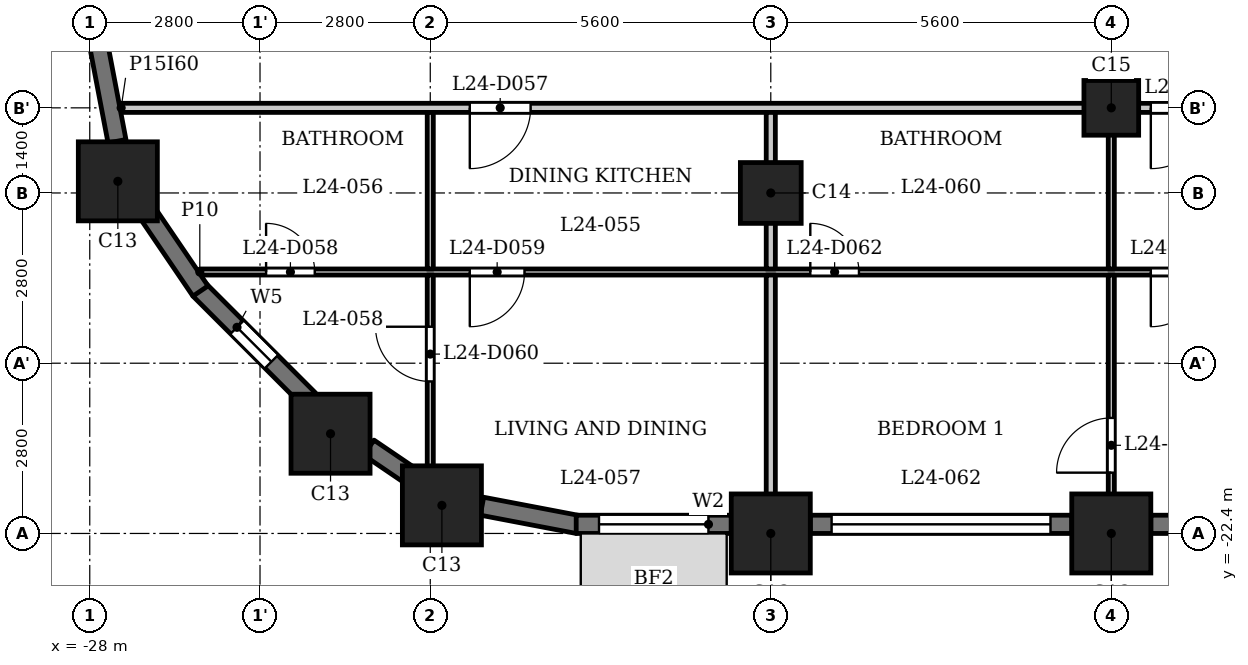
"""IFC4 building model, lengths in metres.
Left out: names, types, materials, properties, quantities, classifications, styles, units other than length and angle.
Written with IfcOpenShell. Run it as: python <this file> out.ifc"""

import sys

from ifc_helpers import new_model, si_unit, direction, frame, frame_2d, origin, origin_2d, place, context, subcontext, project, spatial, rectangle, extrude, element, fill, save


model = new_model("IFC4")
c1 = context("Model", 3, precision=1e-05, world=origin(), true_north=direction((0.0, 1.0)))
c2 = subcontext(c1, "Body", "Model", "MODEL_VIEW")
j1 = project(units=[si_unit("LENGTHUNIT", "METRE"), si_unit("PLANEANGLEUNIT", "RADIAN")], contexts=[c1])
p1 = place(None, origin())
s1 = spatial("IfcSite", under=j1, at=p1, CompositionType="ELEMENT")
p2 = place(p1, origin())
s2 = spatial("IfcBuilding", under=s1, at=p2, CompositionType="ELEMENT")
p3 = place(p2, frame((0.0, 0.0, 97.3)))
s3 = spatial("IfcBuildingStorey", under=s2, at=p3, CompositionType="ELEMENT", Elevation=97.3)
for number, where, z_axis, x_axis in (
    (1, (-22.209, -21.938, 0.0), (0.0, 0.0, 1.0), (1.0, 0.0, 0.0)),
    (2, (-16.8, -22.4, 0.0), (0.0, 0.0, 1.0), (1.0, 0.0, 0.0)),
    (3, (-11.2, -22.4, 0.0), (0.0, 0.0, 1.0), (1.0, 0.0, 0.0)),
    (4, (-27.538, -16.609, 0.0), (0.0, 0.0, 1.0), (1.0, 0.0, 0.0)),
    (5, (-24.04, -20.76, 0.0), (0.0, 0.0, 1.0), (1.0, 0.0, 0.0)),
):
    element("IfcColumn", number, at=place(p3, frame(where, z_axis=z_axis, x_axis=x_axis)), inside=s3, PredefinedType="COLUMN", context=c2, shape_type="SweptSolid", body=[
        extrude(rectangle(XDim=1.3, YDim=1.3, at=origin_2d()), origin(), (0.0, 0.0, 1.0), 3.5),
    ])
p4 = place(p3, frame((-16.8, -16.8, 0.0), z_axis=(0.0, 0.0, 1.0), x_axis=(1.0, 0.0, 0.0)))
e6 = element("IfcColumn", 6, at=p4, inside=s3, PredefinedType="COLUMN", context=c2, shape_type="SweptSolid", body=[
    extrude(rectangle(XDim=1.0, YDim=1.0, at=origin_2d()), origin(), (0.0, 0.0, 1.0), 3.5),
])
p5 = place(p3, frame((-11.2, -15.4, 0.0), z_axis=(0.0, 0.0, 1.0), x_axis=(1.0, 0.0, 0.0)))
e7 = element("IfcColumn", 7, at=p5, inside=s3, PredefinedType="COLUMN", context=c2, shape_type="SweptSolid", body=[
    extrude(rectangle(XDim=0.9, YDim=0.9, at=origin_2d()), origin(), (0.0, 0.0, 1.0), 3.5),
])
p6 = place(p3, frame((-26.197, -18.391, 0.0), z_axis=(0.0, 0.0, 1.0), x_axis=(0.707058908279, -0.707154650853, 0.0)))
e8 = element("IfcWall", 8, at=p6, inside=s3, PredefinedType="SOLIDWALL", context=c2, shape_type="SweptSolid", body=[
    extrude(rectangle(XDim=2.55, YDim=0.3, at=frame_2d((1.275, 0.0))), origin(), (0.0, 0.0, 1.0), 2.4),
])
p7 = place(p6, frame((0.875, 0.0, 0.6)))
e9 = element("IfcOpeningElement", 9, at=p7, cuts=e8, PredefinedType="OPENING", context=c2, shape_type="SweptSolid", body=[
    extrude(rectangle(XDim=0.8, YDim=1.55, at=frame_2d((0.4, 0.775))), frame((0.0, 0.16, 0.0), z_axis=(0.0, -1.0, 0.0), x_axis=(1.0, 0.0, 0.0)), (0.0, 0.0, 1.0), 0.32),
])
p8 = place(p3, frame((-23.41, -20.989, 0.0), z_axis=(0.0, 0.0, 1.0), x_axis=(0.827050703543, -0.562127328787, 0.0)))
e10 = element("IfcWall", 10, at=p8, inside=s3, PredefinedType="SOLIDWALL", context=c2, shape_type="SweptSolid", body=[
    extrude(rectangle(XDim=0.877, YDim=0.3, at=frame_2d((0.438, 0.0))), origin(), (0.0, 0.0, 1.0), 3.2),
])
p9 = place(p3, frame((-21.55, -21.952, 0.0), z_axis=(0.0, 0.0, 1.0), x_axis=(0.982278644094, -0.187426426519, 0.0)))
e11 = element("IfcWall", 11, at=p9, inside=s3, PredefinedType="SOLIDWALL", context=c2, shape_type="SweptSolid", body=[
    extrude(rectangle(XDim=1.606, YDim=0.3, at=frame_2d((0.803, 0.0))), origin(), (0.0, 0.0, 1.0), 2.4),
])
p10 = place(p3, frame((-20.0, -22.25, 0.0), z_axis=(0.0, 0.0, 1.0), x_axis=(1.0, 0.0, 0.0)))
e12 = element("IfcWall", 12, at=p10, inside=s3, PredefinedType="SOLIDWALL", context=c2, shape_type="SweptSolid", body=[
    extrude(rectangle(XDim=2.55, YDim=0.3, at=frame_2d((1.275, 0.0))), origin(), (0.0, 0.0, 1.0), 2.4),
])
p11 = place(p10, frame((0.375, 0.0, 0.9)))
e13 = element("IfcOpeningElement", 13, at=p11, cuts=e12, PredefinedType="OPENING", context=c2, shape_type="SweptSolid", body=[
    extrude(rectangle(XDim=1.8, YDim=1.25, at=frame_2d((0.9, 0.625))), frame((0.0, 0.16, 0.0), z_axis=(0.0, -1.0, 0.0), x_axis=(1.0, 0.0, 0.0)), (0.0, 0.0, 1.0), 0.32),
])
p12 = place(p3, frame((-16.15, -22.25, 0.0), z_axis=(0.0, 0.0, 1.0), x_axis=(1.0, 0.0, 0.0)))
e14 = element("IfcWall", 14, at=p12, inside=s3, PredefinedType="SOLIDWALL", context=c2, shape_type="SweptSolid", body=[
    extrude(rectangle(XDim=4.3, YDim=0.3, at=frame_2d((2.15, 0.0))), origin(), (0.0, 0.0, 1.0), 2.4),
])
p13 = place(p12, frame((0.35, 0.0, 1.2)))
e15 = element("IfcOpeningElement", 15, at=p13, cuts=e14, PredefinedType="OPENING", context=c2, shape_type="SweptSolid", body=[
    extrude(rectangle(XDim=3.6, YDim=0.95, at=frame_2d((1.8, 0.475))), frame((0.0, 0.16, 0.0), z_axis=(0.0, -1.0, 0.0), x_axis=(1.0, 0.0, 0.0)), (0.0, 0.0, 1.0), 0.32),
])
p14 = place(p3, frame((-10.55, -22.25, 0.0), z_axis=(0.0, 0.0, 1.0), x_axis=(1.0, 0.0, 0.0)))
e16 = element("IfcWall", 16, at=p14, inside=s3, PredefinedType="SOLIDWALL", context=c2, shape_type="SweptSolid", body=[
    extrude(rectangle(XDim=4.3, YDim=0.3, at=frame_2d((2.15, 0.0))), origin(), (0.0, 0.0, 1.0), 2.4),
])
p15 = place(p14, frame((0.35, 0.0, 1.2)))
e17 = element("IfcOpeningElement", 17, at=p15, cuts=e16, PredefinedType="OPENING", context=c2, shape_type="SweptSolid", body=[
    extrude(rectangle(XDim=3.6, YDim=0.95, at=frame_2d((1.8, 0.475))), frame((0.0, 0.16, 0.0), z_axis=(0.0, -1.0, 0.0), x_axis=(1.0, 0.0, 0.0)), (0.0, 0.0, 1.0), 0.32),
])
for number, where, z_axis, x_axis in (
    (18, (-27.853, -14.372, 0.0), (0.0, 0.0, 1.0), (0.187, -0.982, 0.0)),
    (19, (-27.082, -17.084, 0.0), (0.0, 0.0, 1.0), (0.562, -0.827, 0.0)),
):
    element("IfcWall", number, at=place(p3, frame(where, z_axis=z_axis, x_axis=x_axis)), inside=s3, PredefinedType="SOLIDWALL", context=c2, shape_type="SweptSolid", body=[
        extrude(rectangle(XDim=1.606, YDim=0.3, at=frame_2d((0.803, 0.0))), origin(), (0.0, 0.0, 1.0), 2.4),
    ])
p16 = place(p3, frame((-26.19, -18.1, 0.0), z_axis=(0.0, 0.0, 1.0), x_axis=(1.0, 0.0, 0.0)))
e20 = element("IfcWall", 20, at=p16, inside=s3, PredefinedType="PARTITIONING", context=c2, shape_type="SweptSolid", body=[
    extrude(rectangle(XDim=52.63, YDim=0.1, at=frame_2d((26.315, 0.0))), origin(), (0.0, 0.0, 1.0), 3.2),
])
p17 = place(p16, frame((1.09, 0.0, 0.0)))
e21 = element("IfcOpeningElement", 21, at=p17, cuts=e20, PredefinedType="OPENING", context=c2, shape_type="SweptSolid", body=[
    extrude(rectangle(XDim=0.8, YDim=2.1, at=frame_2d((0.4, 1.05))), frame((0.0, 0.06, 0.0), z_axis=(0.0, -1.0, 0.0), x_axis=(1.0, 0.0, 0.0)), (0.0, 0.0, 1.0), 0.12),
])
p18 = place(p16, frame((4.44, 0.0, 0.0)))
e22 = element("IfcOpeningElement", 22, at=p18, cuts=e20, PredefinedType="OPENING", context=c2, shape_type="SweptSolid", body=[
    extrude(rectangle(XDim=0.9, YDim=2.1, at=frame_2d((0.45, 1.05))), frame((0.0, 0.06, 0.0), z_axis=(0.0, -1.0, 0.0), x_axis=(1.0, 0.0, 0.0)), (0.0, 0.0, 1.0), 0.12),
])
p19 = place(p16, frame((10.04, 0.0, 0.0)))
e23 = element("IfcOpeningElement", 23, at=p19, cuts=e20, PredefinedType="OPENING", context=c2, shape_type="SweptSolid", body=[
    extrude(rectangle(XDim=0.8, YDim=2.1, at=frame_2d((0.4, 1.05))), frame((0.0, 0.06, 0.0), z_axis=(0.0, -1.0, 0.0), x_axis=(1.0, 0.0, 0.0)), (0.0, 0.0, 1.0), 0.12),
])
p20 = place(p16, frame((15.64, 0.0, 0.0)))
e24 = element("IfcOpeningElement", 24, at=p20, cuts=e20, PredefinedType="OPENING", context=c2, shape_type="SweptSolid", body=[
    extrude(rectangle(XDim=0.9, YDim=2.1, at=frame_2d((0.45, 1.05))), frame((0.0, 0.06, 0.0), z_axis=(0.0, -1.0, 0.0), x_axis=(1.0, 0.0, 0.0)), (0.0, 0.0, 1.0), 0.12),
])
p21 = place(p16, frame((24.74, 0.0, 0.0)))
e25 = element("IfcOpeningElement", 25, at=p21, cuts=e20, PredefinedType="OPENING", context=c2, shape_type="SweptSolid", body=[
    extrude(rectangle(XDim=0.8, YDim=2.1, at=frame_2d((0.4, 1.05))), frame((0.0, 0.06, 0.0), z_axis=(0.0, -1.0, 0.0), x_axis=(1.0, 0.0, 0.0)), (0.0, 0.0, 1.0), 0.12),
])
p22 = place(p16, frame((21.24, 0.0, 0.0)))
e26 = element("IfcOpeningElement", 26, at=p22, cuts=e20, PredefinedType="OPENING", context=c2, shape_type="SweptSolid", body=[
    extrude(rectangle(XDim=0.9, YDim=2.1, at=frame_2d((0.45, 1.05))), frame((0.0, 0.06, 0.0), z_axis=(0.0, -1.0, 0.0), x_axis=(1.0, 0.0, 0.0)), (0.0, 0.0, 1.0), 0.12),
])
p23 = place(p16, frame((35.94, 0.0, 0.0)))
e27 = element("IfcOpeningElement", 27, at=p23, cuts=e20, PredefinedType="OPENING", context=c2, shape_type="SweptSolid", body=[
    extrude(rectangle(XDim=0.8, YDim=2.1, at=frame_2d((0.4, 1.05))), frame((0.0, 0.06, 0.0), z_axis=(0.0, -1.0, 0.0), x_axis=(1.0, 0.0, 0.0)), (0.0, 0.0, 1.0), 0.12),
])
p24 = place(p16, frame((33.19, 0.0, 0.0)))
e28 = element("IfcOpeningElement", 28, at=p24, cuts=e20, PredefinedType="OPENING", context=c2, shape_type="SweptSolid", body=[
    extrude(rectangle(XDim=0.9, YDim=2.1, at=frame_2d((0.45, 1.05))), frame((0.0, 0.06, 0.0), z_axis=(0.0, -1.0, 0.0), x_axis=(1.0, 0.0, 0.0)), (0.0, 0.0, 1.0), 0.12),
])
p25 = place(p16, frame((27.59, 0.0, 0.0)))
e29 = element("IfcOpeningElement", 29, at=p25, cuts=e20, PredefinedType="OPENING", context=c2, shape_type="SweptSolid", body=[
    extrude(rectangle(XDim=0.9, YDim=2.1, at=frame_2d((0.45, 1.05))), frame((0.0, 0.06, 0.0), z_axis=(0.0, -1.0, 0.0), x_axis=(1.0, 0.0, 0.0)), (0.0, 0.0, 1.0), 0.12),
])
p26 = place(p16, frame((29.64, 0.0, 0.0)))
e30 = element("IfcOpeningElement", 30, at=p26, cuts=e20, PredefinedType="OPENING", context=c2, shape_type="SweptSolid", body=[
    extrude(rectangle(XDim=0.9, YDim=2.1, at=frame_2d((0.45, 1.05))), frame((0.0, 0.06, 0.0), z_axis=(0.0, -1.0, 0.0), x_axis=(1.0, 0.0, 0.0)), (0.0, 0.0, 1.0), 0.12),
])
p27 = place(p16, frame((41.54, 0.0, 0.0)))
e31 = element("IfcOpeningElement", 31, at=p27, cuts=e20, PredefinedType="OPENING", context=c2, shape_type="SweptSolid", body=[
    extrude(rectangle(XDim=0.8, YDim=2.1, at=frame_2d((0.4, 1.05))), frame((0.0, 0.06, 0.0), z_axis=(0.0, -1.0, 0.0), x_axis=(1.0, 0.0, 0.0)), (0.0, 0.0, 1.0), 0.12),
])
p28 = place(p16, frame((38.54, 0.0, 0.0)))
e32 = element("IfcOpeningElement", 32, at=p28, cuts=e20, PredefinedType="OPENING", context=c2, shape_type="SweptSolid", body=[
    extrude(rectangle(XDim=0.9, YDim=2.1, at=frame_2d((0.45, 1.05))), frame((0.0, 0.06, 0.0), z_axis=(0.0, -1.0, 0.0), x_axis=(1.0, 0.0, 0.0)), (0.0, 0.0, 1.0), 0.12),
])
p29 = place(p16, frame((49.204, 0.0, 0.0)))
e33 = element("IfcOpeningElement", 33, at=p29, cuts=e20, PredefinedType="OPENING", context=c2, shape_type="SweptSolid", body=[
    extrude(rectangle(XDim=0.8, YDim=2.1, at=frame_2d((0.4, 1.05))), frame((0.0, 0.06, 0.0), z_axis=(0.0, -1.0, 0.0), x_axis=(1.0, 0.0, 0.0)), (0.0, 0.0, 1.0), 0.12),
])
p30 = place(p16, frame((43.64, 0.0, 0.0)))
e34 = element("IfcOpeningElement", 34, at=p30, cuts=e20, PredefinedType="OPENING", context=c2, shape_type="SweptSolid", body=[
    extrude(rectangle(XDim=0.9, YDim=2.1, at=frame_2d((0.45, 1.05))), frame((0.0, 0.06, 0.0), z_axis=(0.0, -1.0, 0.0), x_axis=(1.0, 0.0, 0.0)), (0.0, 0.0, 1.0), 0.12),
])
p31 = place(p3, frame((-27.484, -15.4, 0.0), z_axis=(0.0, 0.0, 1.0), x_axis=(1.0, 0.0, 0.0)))
e35 = element("IfcWall", 35, at=p31, inside=s3, PredefinedType="PARTITIONING", context=c2, shape_type="SweptSolid", body=[
    extrude(rectangle(XDim=54.968, YDim=0.15, at=frame_2d((27.484, 0.0))), origin(), (0.0, 0.0, 1.0), 3.2),
])
p32 = place(p31, frame((5.734, 0.0, 0.0)))
e36 = element("IfcOpeningElement", 36, at=p32, cuts=e35, PredefinedType="OPENING", context=c2, shape_type="SweptSolid", body=[
    extrude(rectangle(XDim=1.0, YDim=2.1, at=frame_2d((0.5, 1.05))), frame((0.0, 0.085, 0.0), z_axis=(0.0, -1.0, 0.0), x_axis=(1.0, 0.0, 0.0)), (0.0, 0.0, 1.0), 0.17),
])
p33 = place(p31, frame((16.934, 0.0, 0.0)))
e37 = element("IfcOpeningElement", 37, at=p33, cuts=e35, PredefinedType="OPENING", context=c2, shape_type="SweptSolid", body=[
    extrude(rectangle(XDim=1.0, YDim=2.1, at=frame_2d((0.5, 1.05))), frame((0.0, 0.085, 0.0), z_axis=(0.0, -1.0, 0.0), x_axis=(1.0, 0.0, 0.0)), (0.0, 0.0, 1.0), 0.17),
])
p34 = place(p31, frame((22.534, 0.0, 0.0)))
e38 = element("IfcOpeningElement", 38, at=p34, cuts=e35, PredefinedType="OPENING", context=c2, shape_type="SweptSolid", body=[
    extrude(rectangle(XDim=1.0, YDim=2.1, at=frame_2d((0.5, 1.05))), frame((0.0, 0.085, 0.0), z_axis=(0.0, -1.0, 0.0), x_axis=(1.0, 0.0, 0.0)), (0.0, 0.0, 1.0), 0.17),
])
p35 = place(p31, frame((31.384, 0.0, 0.0)))
e39 = element("IfcOpeningElement", 39, at=p35, cuts=e35, PredefinedType="OPENING", context=c2, shape_type="SweptSolid", body=[
    extrude(rectangle(XDim=1.0, YDim=2.1, at=frame_2d((0.5, 1.05))), frame((0.0, 0.085, 0.0), z_axis=(0.0, -1.0, 0.0), x_axis=(1.0, 0.0, 0.0)), (0.0, 0.0, 1.0), 0.17),
])
p36 = place(p31, frame((39.584, 0.0, 0.0)))
e40 = element("IfcOpeningElement", 40, at=p36, cuts=e35, PredefinedType="OPENING", context=c2, shape_type="SweptSolid", body=[
    extrude(rectangle(XDim=1.0, YDim=2.1, at=frame_2d((0.5, 1.05))), frame((0.0, 0.085, 0.0), z_axis=(0.0, -1.0, 0.0), x_axis=(1.0, 0.0, 0.0)), (0.0, 0.0, 1.0), 0.17),
])
p37 = place(p31, frame((44.934, 0.0, 0.0)))
e41 = element("IfcOpeningElement", 41, at=p37, cuts=e35, PredefinedType="OPENING", context=c2, shape_type="SweptSolid", body=[
    extrude(rectangle(XDim=1.0, YDim=2.1, at=frame_2d((0.5, 1.05))), frame((0.0, 0.085, 0.0), z_axis=(0.0, -1.0, 0.0), x_axis=(1.0, 0.0, 0.0)), (0.0, 0.0, 1.0), 0.17),
])
p38 = place(p3, frame((-22.4, -21.72, 0.0), z_axis=(0.0, 0.0, 1.0), x_axis=(0.0, 1.0, 0.0)))
e42 = element("IfcWall", 42, at=p38, inside=s3, PredefinedType="PARTITIONING", context=c2, shape_type="SweptSolid", body=[
    extrude(rectangle(XDim=3.57, YDim=0.1, at=frame_2d((1.785, 0.0))), origin(), (0.0, 0.0, 1.0), 3.2),
])
p39 = place(p38, frame((1.82, 0.0, 0.0)))
e43 = element("IfcOpeningElement", 43, at=p39, cuts=e42, PredefinedType="OPENING", context=c2, shape_type="SweptSolid", body=[
    extrude(rectangle(XDim=0.9, YDim=2.1, at=frame_2d((0.45, 1.05))), frame((0.0, 0.06, 0.0), z_axis=(0.0, -1.0, 0.0), x_axis=(1.0, 0.0, 0.0)), (0.0, 0.0, 1.0), 0.12),
])
p40 = place(p3, frame((-22.4, -18.05, 0.0), z_axis=(0.0, 0.0, 1.0), x_axis=(0.0, 1.0, 0.0)))
e44 = element("IfcWall", 44, at=p40, inside=s3, PredefinedType="PARTITIONING", context=c2, shape_type="SweptSolid", body=[
    extrude(rectangle(XDim=2.575, YDim=0.1, at=frame_2d((1.288, 0.0))), origin(), (0.0, 0.0, 1.0), 3.2),
])
p41 = place(p3, frame((-16.8, -23.03, 0.0), z_axis=(0.0, 0.0, 1.0), x_axis=(0.0, 1.0, 0.0)))
e45 = element("IfcWall", 45, at=p41, inside=s3, PredefinedType="PARTITIONING", context=c2, shape_type="SweptSolid", body=[
    extrude(rectangle(XDim=4.88, YDim=0.15, at=frame_2d((2.44, 0.0))), origin(), (0.0, 0.0, 1.0), 3.2),
])
p42 = place(p3, frame((-16.8, -18.05, 0.0), z_axis=(0.0, 0.0, 1.0), x_axis=(0.0, 1.0, 0.0)))
e46 = element("IfcWall", 46, at=p42, inside=s3, PredefinedType="PARTITIONING", context=c2, shape_type="SweptSolid", body=[
    extrude(rectangle(XDim=2.575, YDim=0.15, at=frame_2d((1.288, 0.0))), origin(), (0.0, 0.0, 1.0), 3.2),
])
p43 = place(p3, frame((-11.2, -23.03, 0.0), z_axis=(0.0, 0.0, 1.0), x_axis=(0.0, 1.0, 0.0)))
e47 = element("IfcWall", 47, at=p43, inside=s3, PredefinedType="PARTITIONING", context=c2, shape_type="SweptSolid", body=[
    extrude(rectangle(XDim=4.88, YDim=0.1, at=frame_2d((2.44, 0.0))), origin(), (0.0, 0.0, 1.0), 3.2),
])
p44 = place(p43, frame((1.63, 0.0, 0.0)))
e48 = element("IfcOpeningElement", 48, at=p44, cuts=e47, PredefinedType="OPENING", context=c2, shape_type="SweptSolid", body=[
    extrude(rectangle(XDim=0.9, YDim=2.1, at=frame_2d((0.45, 1.05))), frame((0.0, 0.06, 0.0), z_axis=(0.0, -1.0, 0.0), x_axis=(1.0, 0.0, 0.0)), (0.0, 0.0, 1.0), 0.12),
])
p45 = place(p3, frame((-11.2, -18.05, 0.0), z_axis=(0.0, 0.0, 1.0), x_axis=(0.0, 1.0, 0.0)))
e49 = element("IfcWall", 49, at=p45, inside=s3, PredefinedType="PARTITIONING", context=c2, shape_type="SweptSolid", body=[
    extrude(rectangle(XDim=2.575, YDim=0.1, at=frame_2d((1.288, 0.0))), origin(), (0.0, 0.0, 1.0), 3.2),
])
p46 = place(p32, origin())
e50 = element("IfcDoor", 50, at=p46, inside=s3, OperationType="SINGLE_SWING_LEFT", PredefinedType="DOOR", context=c2, shape_type="SweptSolid", body=[
    extrude(rectangle(XDim=1.0, YDim=2.1, at=frame_2d((0.5, 1.05))), frame((0.0, 0.025, 0.0), z_axis=(0.0, -1.0, 0.0), x_axis=(1.0, 0.0, 0.0)), (0.0, 0.0, 1.0), 0.05),
])
fill(e36, e50)
p47 = place(p17, origin())
e51 = element("IfcDoor", 51, at=p47, inside=s3, OperationType="SINGLE_SWING_RIGHT", PredefinedType="DOOR", context=c2, shape_type="SweptSolid", body=[
    extrude(rectangle(XDim=0.8, YDim=2.1, at=frame_2d((0.4, 1.05))), frame((0.0, 0.025, 0.0), z_axis=(0.0, -1.0, 0.0), x_axis=(1.0, 0.0, 0.0)), (0.0, 0.0, 1.0), 0.05),
])
fill(e21, e51)
p48 = place(p18, origin())
e52 = element("IfcDoor", 52, at=p48, inside=s3, OperationType="SINGLE_SWING_LEFT", PredefinedType="DOOR", context=c2, shape_type="SweptSolid", body=[
    extrude(rectangle(XDim=0.9, YDim=2.1, at=frame_2d((0.45, 1.05))), frame((0.0, 0.025, 0.0), z_axis=(0.0, -1.0, 0.0), x_axis=(1.0, 0.0, 0.0)), (0.0, 0.0, 1.0), 0.05),
])
fill(e22, e52)
p49 = place(p39, origin())
e53 = element("IfcDoor", 53, at=p49, inside=s3, OperationType="SINGLE_SWING_LEFT", PredefinedType="DOOR", context=c2, shape_type="SweptSolid", body=[
    extrude(rectangle(XDim=0.9, YDim=2.1, at=frame_2d((0.45, 1.05))), frame((0.0, 0.025, 0.0), z_axis=(0.0, -1.0, 0.0), x_axis=(1.0, 0.0, 0.0)), (0.0, 0.0, 1.0), 0.05),
])
fill(e43, e53)
p50 = place(p33, origin())
e54 = element("IfcDoor", 54, at=p50, inside=s3, OperationType="SINGLE_SWING_LEFT", PredefinedType="DOOR", context=c2, shape_type="SweptSolid", body=[
    extrude(rectangle(XDim=1.0, YDim=2.1, at=frame_2d((0.5, 1.05))), frame((0.0, 0.025, 0.0), z_axis=(0.0, -1.0, 0.0), x_axis=(1.0, 0.0, 0.0)), (0.0, 0.0, 1.0), 0.05),
])
fill(e37, e54)
p51 = place(p19, origin())
e55 = element("IfcDoor", 55, at=p51, inside=s3, OperationType="SINGLE_SWING_RIGHT", PredefinedType="DOOR", context=c2, shape_type="SweptSolid", body=[
    extrude(rectangle(XDim=0.8, YDim=2.1, at=frame_2d((0.4, 1.05))), frame((0.0, 0.025, 0.0), z_axis=(0.0, -1.0, 0.0), x_axis=(1.0, 0.0, 0.0)), (0.0, 0.0, 1.0), 0.05),
])
fill(e23, e55)
p52 = place(p20, origin())
e56 = element("IfcDoor", 56, at=p52, inside=s3, OperationType="SINGLE_SWING_LEFT", PredefinedType="DOOR", context=c2, shape_type="SweptSolid", body=[
    extrude(rectangle(XDim=0.9, YDim=2.1, at=frame_2d((0.45, 1.05))), frame((0.0, 0.025, 0.0), z_axis=(0.0, -1.0, 0.0), x_axis=(1.0, 0.0, 0.0)), (0.0, 0.0, 1.0), 0.05),
])
fill(e24, e56)
p53 = place(p44, origin())
e57 = element("IfcDoor", 57, at=p53, inside=s3, OperationType="SINGLE_SWING_RIGHT", PredefinedType="DOOR", context=c2, shape_type="SweptSolid", body=[
    extrude(rectangle(XDim=0.9, YDim=2.1, at=frame_2d((0.45, 1.05))), frame((0.0, 0.025, 0.0), z_axis=(0.0, -1.0, 0.0), x_axis=(1.0, 0.0, 0.0)), (0.0, 0.0, 1.0), 0.05),
])
fill(e48, e57)
p54 = place(p7, origin())
e58 = element("IfcWindow", 58, at=p54, inside=s3, PartitioningType="SINGLE_PANEL", PredefinedType="WINDOW", context=c2, shape_type="SweptSolid", body=[
    extrude(rectangle(XDim=0.8, YDim=1.55, at=frame_2d((0.4, 0.775))), frame((0.0, 0.03, 0.0), z_axis=(0.0, -1.0, 0.0), x_axis=(1.0, 0.0, 0.0)), (0.0, 0.0, 1.0), 0.06),
])
fill(e9, e58)
p55 = place(p11, origin())
e59 = element("IfcWindow", 59, at=p55, inside=s3, PartitioningType="SINGLE_PANEL", PredefinedType="WINDOW", context=c2, shape_type="SweptSolid", body=[
    extrude(rectangle(XDim=1.8, YDim=1.25, at=frame_2d((0.9, 0.625))), frame((0.0, 0.03, 0.0), z_axis=(0.0, -1.0, 0.0), x_axis=(1.0, 0.0, 0.0)), (0.0, 0.0, 1.0), 0.06),
])
fill(e13, e59)
p56 = place(p13, origin())
e60 = element("IfcWindow", 60, at=p56, inside=s3, PartitioningType="SINGLE_PANEL", PredefinedType="WINDOW", context=c2, shape_type="SweptSolid", body=[
    extrude(rectangle(XDim=3.6, YDim=0.95, at=frame_2d((1.8, 0.475))), frame((0.0, 0.03, 0.0), z_axis=(0.0, -1.0, 0.0), x_axis=(1.0, 0.0, 0.0)), (0.0, 0.0, 1.0), 0.06),
])
fill(e15, e60)
save(model, sys.argv[1])
